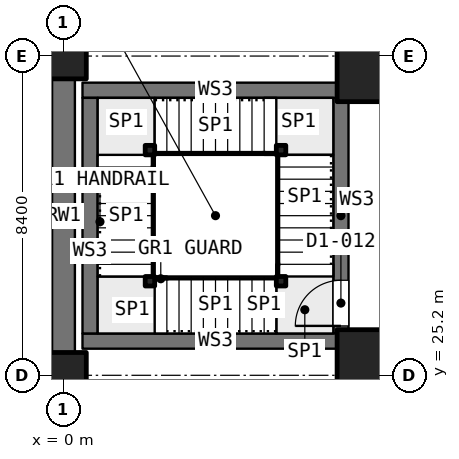
"""IFC4 building model, lengths in metres.
Left out: names, types, materials, properties, quantities, classifications, styles, units other than length and angle.
Written with IfcOpenShell. Run it as: python <this file> out.ifc"""

import sys

from ifc_helpers import new_model, si_unit, direction, frame, frame_2d, origin, origin_2d, place, context, subcontext, project, spatial, rectangle, extrude, element, fill, save


model = new_model("IFC4")
c1 = context("Model", 3, precision=1e-05, world=origin(), true_north=direction((0.0, 1.0)))
c2 = subcontext(c1, "Body", "Model", "MODEL_VIEW")
j1 = project(units=[si_unit("LENGTHUNIT", "METRE"), si_unit("PLANEANGLEUNIT", "RADIAN")], contexts=[c1])
p1 = place(None, origin())
s1 = spatial("IfcSite", under=j1, at=p1, CompositionType="ELEMENT")
p2 = place(p1, origin())
s2 = spatial("IfcBuilding", under=s1, at=p2, CompositionType="ELEMENT")
p3 = place(p2, frame((0.0, 0.0, -5.4)))
s3 = spatial("IfcBuildingStorey", under=s2, at=p3, CompositionType="ELEMENT", Elevation=-5.4)
for number, where, z_axis, x_axis in (
    (1, (0.0, 25.2, 0.0), (0.0, 0.0, 1.0), (1.0, 0.0, 0.0)),
    (2, (0.0, 33.6, 0.0), (0.0, 0.0, 1.0), (1.0, 0.0, 0.0)),
):
    element("IfcColumn", number, at=place(p3, frame(where, z_axis=z_axis, x_axis=x_axis)), inside=s3, PredefinedType="COLUMN", context=c2, shape_type="SweptSolid", body=[
        extrude(rectangle(XDim=1.2, YDim=1.2, at=origin_2d()), origin(), (0.0, 0.0, 1.0), 5.4),
    ])
for number, where, z_axis, x_axis in (
    (3, (8.4, 25.2, 0.0), (0.0, 0.0, 1.0), (1.0, 0.0, 0.0)),
    (4, (8.4, 33.6, 0.0), (0.0, 0.0, 1.0), (1.0, 0.0, 0.0)),
):
    element("IfcColumn", number, at=place(p3, frame(where, z_axis=z_axis, x_axis=x_axis)), inside=s3, PredefinedType="COLUMN", context=c2, shape_type="SweptSolid", body=[
        extrude(rectangle(XDim=2.4, YDim=2.4, at=origin_2d()), origin(), (0.0, 0.0, 1.0), 5.4),
    ])
p4 = place(p3, frame((0.0, 25.8, 0.0), z_axis=(0.0, 0.0, 1.0), x_axis=(0.0, 1.0, 0.0)))
e5 = element("IfcWall", 5, at=p4, inside=s3, PredefinedType="SOLIDWALL", context=c2, shape_type="SweptSolid", body=[
    extrude(rectangle(XDim=7.2, YDim=0.6, at=frame_2d((3.6, 0.0))), origin(), (0.0, 0.0, 1.0), 5.1),
])
for number, where, z_axis, x_axis in (
    (6, (0.5, 26.1, 0.0), (0.0, 0.0, 1.0), (1.0, 0.0, 0.0)),
    (7, (0.5, 32.7, 0.0), (0.0, 0.0, 1.0), (1.0, 0.0, 0.0)),
):
    element("IfcWall", number, at=place(p3, frame(where, z_axis=z_axis, x_axis=x_axis)), inside=s3, PredefinedType="SOLIDWALL", context=c2, shape_type="SweptSolid", body=[
        extrude(rectangle(XDim=7.0, YDim=0.4, at=frame_2d((3.5, 0.0))), origin(), (0.0, 0.0, 1.0), 5.1),
    ])
p5 = place(p3, frame((0.7, 26.3, 0.0), z_axis=(0.0, 0.0, 1.0), x_axis=(0.0, 1.0, 0.0)))
e8 = element("IfcWall", 8, at=p5, inside=s3, PredefinedType="SOLIDWALL", context=c2, shape_type="SweptSolid", body=[
    extrude(rectangle(XDim=6.2, YDim=0.4, at=frame_2d((3.1, 0.0))), origin(), (0.0, 0.0, 1.0), 5.1),
])
p6 = place(p3, frame((7.3, 26.3, 0.0), z_axis=(0.0, 0.0, 1.0), x_axis=(0.0, 1.0, 0.0)))
e9 = element("IfcWall", 9, at=p6, inside=s3, PredefinedType="SOLIDWALL", context=c2, shape_type="SweptSolid", body=[
    extrude(rectangle(XDim=6.2, YDim=0.4, at=frame_2d((3.1, 0.0))), origin(), (0.0, 0.0, 1.0), 5.1),
])
p7 = place(p6, frame((0.2, 0.0, 0.0)))
e10 = element("IfcOpeningElement", 10, at=p7, cuts=e9, PredefinedType="OPENING", context=c2, shape_type="SweptSolid", body=[
    extrude(rectangle(XDim=1.2, YDim=2.1, at=frame_2d((0.6, 1.05))), frame((0.0, 0.21, 0.0), z_axis=(0.0, -1.0, 0.0), x_axis=(1.0, 0.0, 0.0)), (0.0, 0.0, 1.0), 0.42),
])
for number, where, z_axis, x_axis in (
    (11, (5.725, 27.675, 0.0), (0.0, 0.0, 1.0), (1.0, 0.0, 0.0)),
    (12, (2.275, 27.675, 0.0), (0.0, 0.0, 1.0), (1.0, 0.0, 0.0)),
    (13, (2.275, 31.125, 0.0), (0.0, 0.0, 1.0), (1.0, 0.0, 0.0)),
    (14, (5.725, 31.125, 0.0), (0.0, 0.0, 1.0), (1.0, 0.0, 0.0)),
):
    element("IfcColumn", number, at=place(p3, frame(where, z_axis=z_axis, x_axis=x_axis)), inside=s3, PredefinedType="COLUMN", context=c2, shape_type="SweptSolid", body=[
        extrude(rectangle(XDim=0.25, YDim=0.25, at=origin_2d()), origin(), (0.0, 0.0, 1.0), 5.4),
    ])
p8 = place(p7, origin())
e15 = element("IfcDoor", 15, at=p8, inside=s3, OperationType="SINGLE_SWING_RIGHT", PredefinedType="DOOR", context=c2, shape_type="SweptSolid", body=[
    extrude(rectangle(XDim=1.2, YDim=2.1, at=frame_2d((0.6, 1.05))), frame((0.0, 0.025, 0.0), z_axis=(0.0, -1.0, 0.0), x_axis=(1.0, 0.0, 0.0)), (0.0, 0.0, 1.0), 0.05),
])
fill(e10, e15)
save(model, sys.argv[1])
